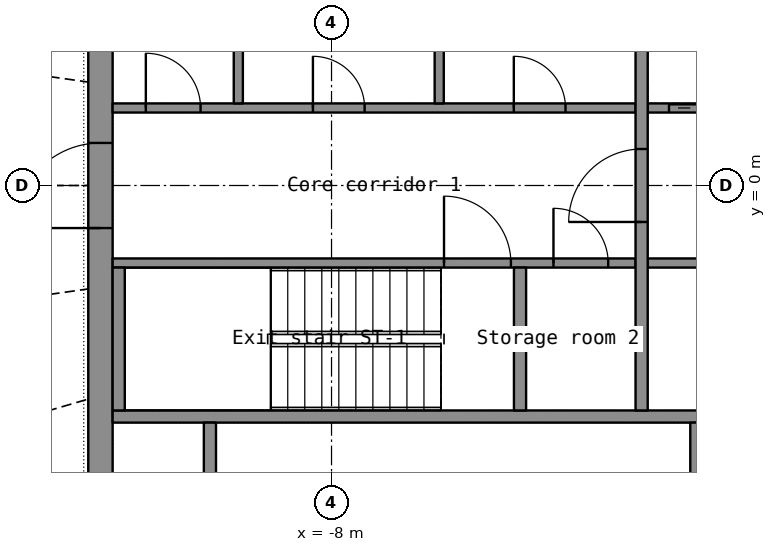
"""IFC4 building model, lengths in metres.
Left out: names, types, materials, properties, quantities, classifications, styles, units other than length and angle.
Written with IfcOpenShell. Run it as: python <this file> out.ifc"""

import sys

from ifc_helpers import new_model, si_unit, direction, frame, frame_2d, origin, place, context, subcontext, project, spatial, rectangle, extrude, element, fill, save


model = new_model("IFC4")
c1 = context("Model", 3, precision=1e-05, world=origin(), true_north=direction((0.0, 1.0)))
c2 = subcontext(c1, "Body", "Model", "MODEL_VIEW")
j1 = project(units=[si_unit("LENGTHUNIT", "METRE"), si_unit("PLANEANGLEUNIT", "RADIAN")], contexts=[c1])
p1 = place(None, origin())
s1 = spatial("IfcSite", under=j1, at=p1, CompositionType="ELEMENT")
p2 = place(p1, origin())
s2 = spatial("IfcBuilding", under=s1, at=p2, CompositionType="ELEMENT")
p3 = place(p2, frame((0.0, 0.0, 224.5)))
s3 = spatial("IfcBuildingStorey", under=s2, at=p3, CompositionType="ELEMENT", Elevation=224.5)
p4 = place(p3, frame((-11.8, -7.2, 0.0), z_axis=(0.0, 0.0, 1.0), x_axis=(0.0, 1.0, 0.0)))
e1 = element("IfcWall", 1, at=p4, inside=s3, PredefinedType="SHEAR", context=c2, shape_type="SweptSolid", body=[
    extrude(rectangle(XDim=14.4, YDim=0.4, at=frame_2d((7.2, 0.0))), origin(), (0.0, 0.0, 1.0), 3.3),
])
p5 = place(p4, frame((6.5, 0.0, 0.0)))
e2 = element("IfcOpeningElement", 2, at=p5, cuts=e1, PredefinedType="OPENING", context=c2, shape_type="SweptSolid", body=[
    extrude(rectangle(XDim=1.4, YDim=2.2, at=frame_2d((0.7, 1.1))), frame((0.0, 0.21, 0.0), z_axis=(0.0, -1.0, 0.0), x_axis=(1.0, 0.0, 0.0)), (0.0, 0.0, 1.0), 0.42),
])
p6 = place(p3, frame((-11.6, -3.8, 0.0), z_axis=(0.0, 0.0, 1.0), x_axis=(1.0, 0.0, 0.0)))
e3 = element("IfcWall", 3, at=p6, inside=s3, PredefinedType="SHEAR", context=c2, shape_type="SweptSolid", body=[
    extrude(rectangle(XDim=23.2, YDim=0.2, at=frame_2d((11.6, 0.0))), origin(), (0.0, 0.0, 1.0), 3.3),
])
p7 = place(p3, frame((-10.0, -6.8, 0.0), z_axis=(0.0, 0.0, 1.0), x_axis=(0.0, 1.0, 0.0)))
e4 = element("IfcWall", 4, at=p7, inside=s3, PredefinedType="SHEAR", context=c2, shape_type="SweptSolid", body=[
    extrude(rectangle(XDim=2.9, YDim=0.2, at=frame_2d((1.45, 0.0))), origin(), (0.0, 0.0, 1.0), 3.3),
])
p8 = place(p3, frame((-2.0, -6.8, 0.0), z_axis=(0.0, 0.0, 1.0), x_axis=(0.0, 1.0, 0.0)))
e5 = element("IfcWall", 5, at=p8, inside=s3, PredefinedType="PARTITIONING", context=c2, shape_type="SweptSolid", body=[
    extrude(rectangle(XDim=2.9, YDim=0.2, at=frame_2d((1.45, 0.0))), origin(), (0.0, 0.0, 1.0), 3.3),
])
p9 = place(p3, frame((-11.6, -1.275, 0.0), z_axis=(0.0, 0.0, 1.0), x_axis=(1.0, 0.0, 0.0)))
e6 = element("IfcWall", 6, at=p9, inside=s3, PredefinedType="SHEAR", context=c2, shape_type="SweptSolid", body=[
    extrude(rectangle(XDim=8.6, YDim=0.15, at=frame_2d((4.3, 0.0))), origin(), (0.0, 0.0, 1.0), 3.3),
])
p10 = place(p9, frame((5.45, 0.0, 0.0)))
e7 = element("IfcOpeningElement", 7, at=p10, cuts=e6, PredefinedType="OPENING", context=c2, shape_type="SweptSolid", body=[
    extrude(rectangle(XDim=1.1, YDim=2.15, at=frame_2d((0.55, 1.075))), frame((0.0, 0.085, 0.0), z_axis=(0.0, -1.0, 0.0), x_axis=(1.0, 0.0, 0.0)), (0.0, 0.0, 1.0), 0.17),
])
p11 = place(p9, frame((7.25, 0.0, 0.0)))
e8 = element("IfcOpeningElement", 8, at=p11, cuts=e6, PredefinedType="OPENING", context=c2, shape_type="SweptSolid", body=[
    extrude(rectangle(XDim=0.9, YDim=2.1, at=frame_2d((0.45, 1.05))), frame((0.0, 0.085, 0.0), z_axis=(0.0, -1.0, 0.0), x_axis=(1.0, 0.0, 0.0)), (0.0, 0.0, 1.0), 0.17),
])
p12 = place(p3, frame((-2.8, -1.275, 0.0), z_axis=(0.0, 0.0, 1.0), x_axis=(1.0, 0.0, 0.0)))
e9 = element("IfcWall", 9, at=p12, inside=s3, PredefinedType="SHEAR", context=c2, shape_type="SweptSolid", body=[
    extrude(rectangle(XDim=5.6, YDim=0.15, at=frame_2d((2.8, 0.0))), origin(), (0.0, 0.0, 1.0), 3.3),
])
p13 = place(p12, frame((4.15, 0.0, 0.0)))
e10 = element("IfcOpeningElement", 10, at=p13, cuts=e9, PredefinedType="OPENING", context=c2, shape_type="SweptSolid", body=[
    extrude(rectangle(XDim=1.1, YDim=2.2, at=frame_2d((0.55, 1.1))), frame((0.0, 0.085, 0.0), z_axis=(0.0, -1.0, 0.0), x_axis=(1.0, 0.0, 0.0)), (0.0, 0.0, 1.0), 0.17),
])
p14 = place(p12, frame((1.35, 0.0, 0.0)))
e11 = element("IfcOpeningElement", 11, at=p14, cuts=e9, PredefinedType="OPENING", context=c2, shape_type="SweptSolid", body=[
    extrude(rectangle(XDim=0.9, YDim=2.1, at=frame_2d((0.45, 1.05))), frame((0.0, 0.085, 0.0), z_axis=(0.0, -1.0, 0.0), x_axis=(1.0, 0.0, 0.0)), (0.0, 0.0, 1.0), 0.17),
])
p15 = place(p3, frame((-11.6, 1.275, 0.0), z_axis=(0.0, 0.0, 1.0), x_axis=(1.0, 0.0, 0.0)))
e12 = element("IfcWall", 12, at=p15, inside=s3, PredefinedType="PARTITIONING", context=c2, shape_type="SweptSolid", body=[
    extrude(rectangle(XDim=8.6, YDim=0.15, at=frame_2d((4.3, 0.0))), origin(), (0.0, 0.0, 1.0), 3.3),
])
p16 = place(p15, frame((0.546, 0.0, 0.0)))
e13 = element("IfcOpeningElement", 13, at=p16, cuts=e12, PredefinedType="OPENING", context=c2, shape_type="SweptSolid", body=[
    extrude(rectangle(XDim=0.9, YDim=2.1, at=frame_2d((0.45, 1.05))), frame((0.0, 0.085, 0.0), z_axis=(0.0, -1.0, 0.0), x_axis=(1.0, 0.0, 0.0)), (0.0, 0.0, 1.0), 0.17),
])
p17 = place(p15, frame((3.294, 0.0, 0.0)))
e14 = element("IfcOpeningElement", 14, at=p17, cuts=e12, PredefinedType="OPENING", context=c2, shape_type="SweptSolid", body=[
    extrude(rectangle(XDim=0.85, YDim=2.1, at=frame_2d((0.425, 1.05))), frame((0.0, 0.085, 0.0), z_axis=(0.0, -1.0, 0.0), x_axis=(1.0, 0.0, 0.0)), (0.0, 0.0, 1.0), 0.17),
])
p18 = place(p15, frame((6.598, 0.0, 0.0)))
e15 = element("IfcOpeningElement", 15, at=p18, cuts=e12, PredefinedType="OPENING", context=c2, shape_type="SweptSolid", body=[
    extrude(rectangle(XDim=0.85, YDim=2.1, at=frame_2d((0.425, 1.05))), frame((0.0, 0.085, 0.0), z_axis=(0.0, -1.0, 0.0), x_axis=(1.0, 0.0, 0.0)), (0.0, 0.0, 1.0), 0.17),
])
p19 = place(p3, frame((-2.8, 1.275, 0.0), z_axis=(0.0, 0.0, 1.0), x_axis=(1.0, 0.0, 0.0)))
e16 = element("IfcWall", 16, at=p19, inside=s3, PredefinedType="SHEAR", context=c2, shape_type="SweptSolid", body=[
    extrude(rectangle(XDim=5.6, YDim=0.15, at=frame_2d((2.8, 0.0))), origin(), (0.0, 0.0, 1.0), 3.3),
])
p20 = place(p19, frame((0.35, 0.0, 0.0)))
e17 = element("IfcOpeningElement", 17, at=p20, cuts=e16, PredefinedType="OPENING", context=c2, shape_type="SweptSolid", body=[
    extrude(rectangle(XDim=1.1, YDim=2.2, at=frame_2d((0.55, 1.1))), frame((0.0, 0.085, 0.0), z_axis=(0.0, -1.0, 0.0), x_axis=(1.0, 0.0, 0.0)), (0.0, 0.0, 1.0), 0.17),
])
p21 = place(p19, frame((2.326, 0.0, 0.0)))
e18 = element("IfcOpeningElement", 18, at=p21, cuts=e16, PredefinedType="OPENING", context=c2, shape_type="SweptSolid", body=[
    extrude(rectangle(XDim=0.9, YDim=2.1, at=frame_2d((0.45, 1.05))), frame((0.0, 0.085, 0.0), z_axis=(0.0, -1.0, 0.0), x_axis=(1.0, 0.0, 0.0)), (0.0, 0.0, 1.0), 0.17),
])
p22 = place(p19, frame((4.201, 0.0, 0.0)))
e19 = element("IfcOpeningElement", 19, at=p22, cuts=e16, PredefinedType="OPENING", context=c2, shape_type="SweptSolid", body=[
    extrude(rectangle(XDim=0.9, YDim=2.1, at=frame_2d((0.45, 1.05))), frame((0.0, 0.085, 0.0), z_axis=(0.0, -1.0, 0.0), x_axis=(1.0, 0.0, 0.0)), (0.0, 0.0, 1.0), 0.17),
])
p23 = place(p3, frame((-2.9, -3.7, 0.0), z_axis=(0.0, 0.0, 1.0), x_axis=(0.0, 1.0, 0.0)))
e20 = element("IfcWall", 20, at=p23, inside=s3, PredefinedType="SHEAR", context=c2, shape_type="SweptSolid", body=[
    extrude(rectangle(XDim=7.4, YDim=0.2, at=frame_2d((3.7, 0.0))), origin(), (0.0, 0.0, 1.0), 3.3),
])
p24 = place(p23, frame((3.1, 0.0, 0.0)))
e21 = element("IfcOpeningElement", 21, at=p24, cuts=e20, PredefinedType="OPENING", context=c2, shape_type="SweptSolid", body=[
    extrude(rectangle(XDim=1.2, YDim=2.2, at=frame_2d((0.6, 1.1))), frame((0.0, 0.11, 0.0), z_axis=(0.0, -1.0, 0.0), x_axis=(1.0, 0.0, 0.0)), (0.0, 0.0, 1.0), 0.22),
])
for number, where, z_axis, x_axis in (
    (22, (-11.5, -3.7, 0.0), (0.0, 0.0, 1.0), (0.0, 1.0, 0.0)),
    (23, (-4.9, -3.7, 0.0), (0.0, 0.0, 1.0), (0.0, 1.0, 0.0)),
):
    element("IfcWall", number, at=place(p3, frame(where, z_axis=z_axis, x_axis=x_axis)), inside=s3, PredefinedType="SHEAR", context=c2, shape_type="SweptSolid", body=[
        extrude(rectangle(XDim=2.35, YDim=0.2, at=frame_2d((1.175, 0.0))), origin(), (0.0, 0.0, 1.0), 3.3),
    ])
for number, where, z_axis, x_axis in (
    (24, (-9.533, 1.35, 0.0), (0.0, 0.0, 1.0), (0.0, 1.0, 0.0)),
    (25, (-6.229, 1.35, 0.0), (0.0, 0.0, 1.0), (0.0, 1.0, 0.0)),
):
    element("IfcWall", number, at=place(p3, frame(where, z_axis=z_axis, x_axis=x_axis)), inside=s3, PredefinedType="PARTITIONING", context=c2, shape_type="SweptSolid", body=[
        extrude(rectangle(XDim=2.35, YDim=0.15, at=frame_2d((1.175, 0.0))), origin(), (0.0, 0.0, 1.0), 3.3),
    ])
p25 = place(p5, origin())
e26 = element("IfcDoor", 26, at=p25, inside=s3, OperationType="DOUBLE_DOOR_SINGLE_SWING", PredefinedType="DOOR", context=c2, shape_type="SweptSolid", body=[
    extrude(rectangle(XDim=1.4, YDim=2.2, at=frame_2d((0.7, 1.1))), frame((0.0, 0.025, 0.0), z_axis=(0.0, -1.0, 0.0), x_axis=(1.0, 0.0, 0.0)), (0.0, 0.0, 1.0), 0.05),
])
fill(e2, e26)
p26 = place(p24, origin())
e27 = element("IfcDoor", 27, at=p26, inside=s3, OperationType="SINGLE_SWING_LEFT", PredefinedType="DOOR", context=c2, shape_type="SweptSolid", body=[
    extrude(rectangle(XDim=1.2, YDim=2.2, at=frame_2d((0.6, 1.1))), frame((0.0, 0.025, 0.0), z_axis=(0.0, -1.0, 0.0), x_axis=(1.0, 0.0, 0.0)), (0.0, 0.0, 1.0), 0.05),
])
fill(e21, e27)
p27 = place(p20, origin())
e28 = element("IfcDoor", 28, at=p27, inside=s3, OperationType="DOUBLE_DOOR_SLIDING", PredefinedType="DOOR", context=c2, shape_type="SweptSolid", body=[
    extrude(rectangle(XDim=1.1, YDim=2.2, at=frame_2d((0.55, 1.1))), frame((0.0, 0.025, 0.0), z_axis=(0.0, -1.0, 0.0), x_axis=(1.0, 0.0, 0.0)), (0.0, 0.0, 1.0), 0.05),
])
fill(e17, e28)
p28 = place(p10, origin())
e29 = element("IfcDoor", 29, at=p28, inside=s3, OperationType="SINGLE_SWING_LEFT", PredefinedType="DOOR", context=c2, shape_type="SweptSolid", body=[
    extrude(rectangle(XDim=1.1, YDim=2.15, at=frame_2d((0.55, 1.075))), frame((0.0, 0.025, 0.0), z_axis=(0.0, -1.0, 0.0), x_axis=(1.0, 0.0, 0.0)), (0.0, 0.0, 1.0), 0.05),
])
fill(e7, e29)
p29 = place(p16, origin())
e30 = element("IfcDoor", 30, at=p29, inside=s3, OperationType="SINGLE_SWING_LEFT", PredefinedType="DOOR", context=c2, shape_type="SweptSolid", body=[
    extrude(rectangle(XDim=0.9, YDim=2.1, at=frame_2d((0.45, 1.05))), frame((0.0, 0.025, 0.0), z_axis=(0.0, -1.0, 0.0), x_axis=(1.0, 0.0, 0.0)), (0.0, 0.0, 1.0), 0.05),
])
fill(e13, e30)
p30 = place(p17, origin())
e31 = element("IfcDoor", 31, at=p30, inside=s3, OperationType="SINGLE_SWING_LEFT", PredefinedType="DOOR", context=c2, shape_type="SweptSolid", body=[
    extrude(rectangle(XDim=0.85, YDim=2.1, at=frame_2d((0.425, 1.05))), frame((0.0, 0.025, 0.0), z_axis=(0.0, -1.0, 0.0), x_axis=(1.0, 0.0, 0.0)), (0.0, 0.0, 1.0), 0.05),
])
fill(e14, e31)
p31 = place(p18, origin())
e32 = element("IfcDoor", 32, at=p31, inside=s3, OperationType="SINGLE_SWING_LEFT", PredefinedType="DOOR", context=c2, shape_type="SweptSolid", body=[
    extrude(rectangle(XDim=0.85, YDim=2.1, at=frame_2d((0.425, 1.05))), frame((0.0, 0.025, 0.0), z_axis=(0.0, -1.0, 0.0), x_axis=(1.0, 0.0, 0.0)), (0.0, 0.0, 1.0), 0.05),
])
fill(e15, e32)
p32 = place(p11, origin())
e33 = element("IfcDoor", 33, at=p32, inside=s3, OperationType="SINGLE_SWING_LEFT", PredefinedType="DOOR", context=c2, shape_type="SweptSolid", body=[
    extrude(rectangle(XDim=0.9, YDim=2.1, at=frame_2d((0.45, 1.05))), frame((0.0, 0.025, 0.0), z_axis=(0.0, -1.0, 0.0), x_axis=(1.0, 0.0, 0.0)), (0.0, 0.0, 1.0), 0.05),
])
fill(e8, e33)
save(model, sys.argv[1])
